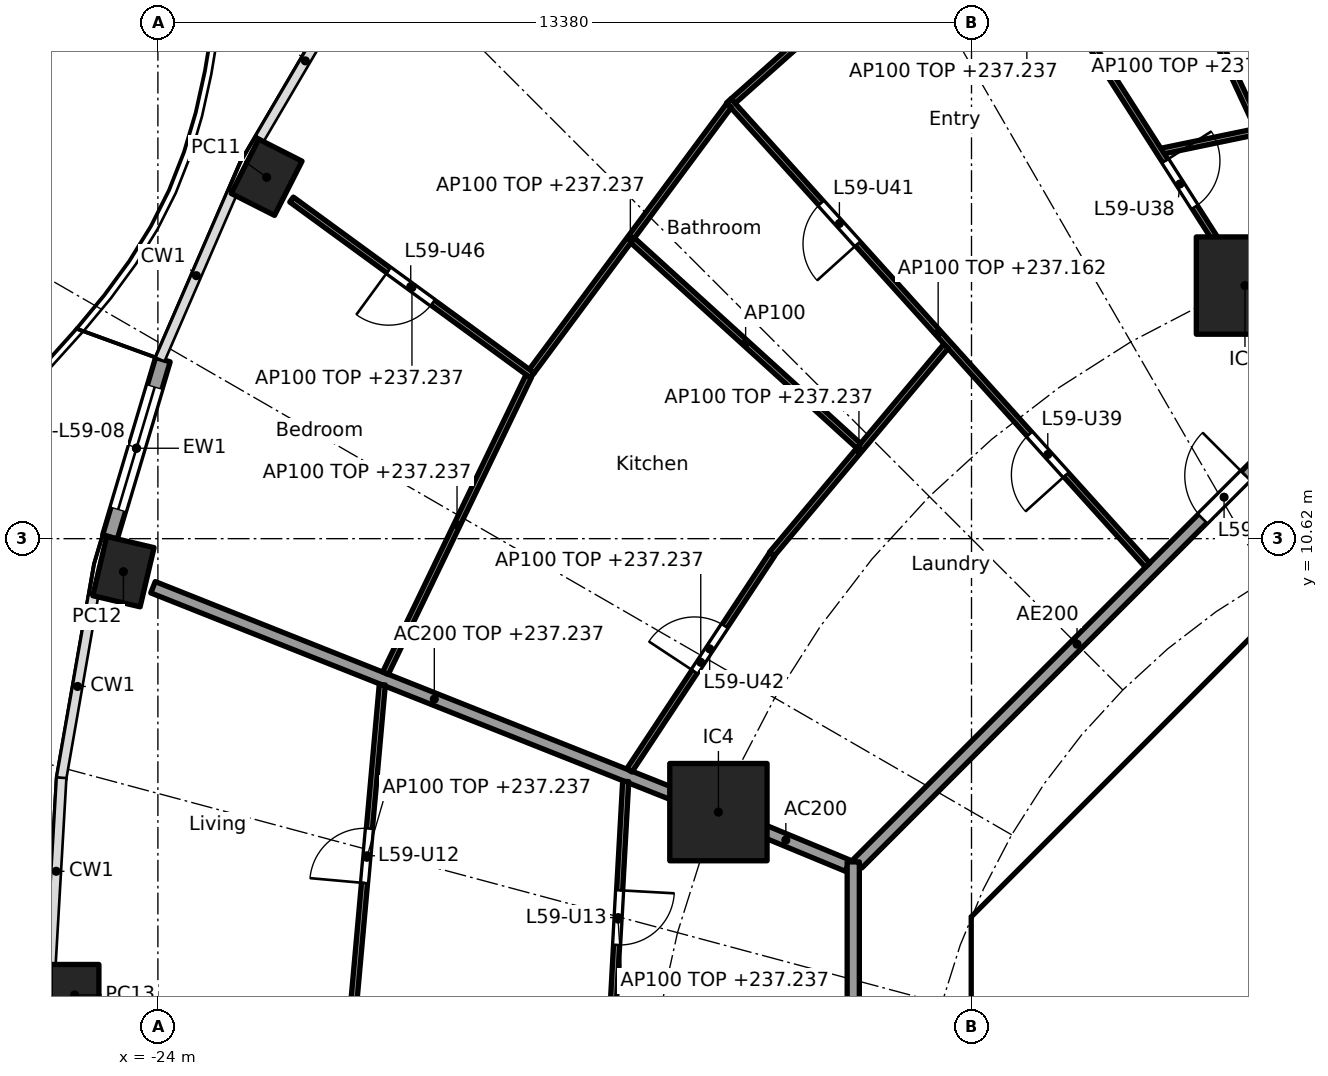
"""IFC4 building model, lengths in metres.
Left out: names, types, materials, properties, quantities, classifications, styles, units other than length and angle.
Written with IfcOpenShell. Run it as: python <this file> out.ifc"""

import sys

from ifc_helpers import new_model, si_unit, direction, frame, frame_2d, origin, origin_2d, place, context, subcontext, project, spatial, polyline, rectangle, hollow_rectangle, outline, extrude, element, fill, save


model = new_model("IFC4")
c1 = context("Model", 3, precision=1e-05, world=origin(), true_north=direction((0.0, 1.0)))
c2 = subcontext(c1, "Body", "Model", "MODEL_VIEW")
j1 = project(units=[si_unit("LENGTHUNIT", "METRE"), si_unit("PLANEANGLEUNIT", "RADIAN")], contexts=[c1])
p1 = place(None, origin())
s1 = spatial("IfcSite", under=j1, at=p1, CompositionType="ELEMENT")
p2 = place(p1, origin())
s2 = spatial("IfcBuilding", under=s1, at=p2, CompositionType="ELEMENT")
p3 = place(p2, frame((0.0, 0.0, 234.4)))
s3 = spatial("IfcBuildingStorey", under=s2, at=p3, CompositionType="ELEMENT", Elevation=234.4)
for number, where, z_axis, x_axis in (
    (1, (-22.212, 16.563, 0.0), (0.0, 0.0, 1.0), (-0.452, -0.892, 0.0)),
    (2, (-24.567, 10.077, 0.0), (0.0, 0.0, 1.0), (-0.229, -0.973, 0.0)),
    (3, (-25.37, 3.118, 0.0), (0.0, 0.0, 1.0), (0.0, -1.0, 0.0)),
):
    element("IfcColumn", number, at=place(p3, frame(where, z_axis=z_axis, x_axis=x_axis)), inside=s3, PredefinedType="COLUMN", context=c2, shape_type="SweptSolid", body=[
        extrude(hollow_rectangle(XDim=1.0, YDim=0.8, WallThickness=0.032, at=origin_2d()), origin(), (0.0, 0.0, 1.0), 3.7),
    ])
for number, where, z_axis, x_axis in (
    (4, (-6.123, 14.782, 0.0), (0.0, 0.0, 1.0), (1.0, 0.0, 0.0)),
    (5, (-14.782, 6.123, 0.0), (0.0, 0.0, 1.0), (1.0, 0.0, 0.0)),
):
    element("IfcColumn", number, at=place(p3, frame(where, z_axis=z_axis, x_axis=x_axis)), inside=s3, PredefinedType="COLUMN", context=c2, shape_type="SweptSolid", body=[
        extrude(rectangle(XDim=1.6, YDim=1.6, at=origin_2d()), origin(), (0.0, 0.0, 1.0), 3.7),
    ])
p4 = place(p3, frame((-24.787, 10.65, 0.0), z_axis=(0.0, 0.0, 1.0), x_axis=(0.285859454825, 0.95827155446, 0.0)))
e6 = element("IfcWall", 6, at=p4, inside=s3, PredefinedType="SOLIDWALL", context=c2, shape_type="SweptSolid", body=[
    extrude(rectangle(XDim=3.041, YDim=0.25, at=frame_2d((1.52, 0.0))), origin(), (0.0, 0.0, 1.0), 3.44),
])
p5 = place(p4, frame((0.47, 0.0, 0.0)))
e7 = element("IfcOpeningElement", 7, at=p5, cuts=e6, PredefinedType="OPENING", context=c2, shape_type="SweptSolid", body=[
    extrude(rectangle(XDim=2.1, YDim=2.4, at=frame_2d((1.05, 1.2))), frame((0.0, 0.135, 0.0), z_axis=(0.0, -1.0, 0.0), x_axis=(1.0, 0.0, 0.0)), (0.0, 0.0, 1.0), 0.27),
])
p6 = place(p3, frame((-4.613, 9.988, 0.0), z_axis=(0.0, 0.0, 1.0), x_axis=(-0.707106781187, -0.707106781187, 0.0)))
e8 = element("IfcWall", 8, at=p6, inside=s3, PredefinedType="SHEAR", context=c2, shape_type="SweptSolid", body=[
    extrude(rectangle(XDim=7.602, YDim=0.6, at=frame_2d((3.801, 0.0))), origin(), (0.0, 0.0, 1.0), 3.44),
])
p7 = place(p6, frame((0.351, 0.0, 0.0)))
e9 = element("IfcOpeningElement", 9, at=p7, cuts=e8, PredefinedType="OPENING", context=c2, shape_type="SweptSolid", body=[
    extrude(rectangle(XDim=1.1, YDim=2.1, at=frame_2d((0.55, 1.05))), frame((0.0, 0.31, 0.0), z_axis=(0.0, -1.0, 0.0), x_axis=(1.0, 0.0, 0.0)), (0.0, 0.0, 1.0), 0.62),
])
p8 = place(p3, frame((-10.325, 3.801, 0.0), z_axis=(0.0, 0.0, 1.0), x_axis=(0.0, -1.0, 0.0)))
e10 = element("IfcWall", 10, at=p8, inside=s3, PredefinedType="SHEAR", context=c2, shape_type="SweptSolid", body=[
    extrude(rectangle(XDim=7.602, YDim=0.6, at=frame_2d((3.801, 0.0))), origin(), (0.0, 0.0, 1.0), 3.44),
])
p9 = place(p8, frame((0.651, 0.0, 0.0)))
e11 = element("IfcOpeningElement", 11, at=p9, cuts=e10, PredefinedType="OPENING", context=c2, shape_type="SweptSolid", body=[
    extrude(rectangle(XDim=1.5, YDim=2.1, at=frame_2d((0.75, 1.05))), frame((0.0, 0.31, 0.0), z_axis=(0.0, -1.0, 0.0), x_axis=(1.0, 0.0, 0.0)), (0.0, 0.0, 1.0), 0.62),
])
p10 = place(p8, frame((5.451, 0.0, 0.0)))
e12 = element("IfcOpeningElement", 12, at=p10, cuts=e10, PredefinedType="OPENING", context=c2, shape_type="SweptSolid", body=[
    extrude(rectangle(XDim=1.5, YDim=2.1, at=frame_2d((0.75, 1.05))), frame((0.0, 0.31, 0.0), z_axis=(0.0, -1.0, 0.0), x_axis=(1.0, 0.0, 0.0)), (0.0, 0.0, 1.0), 0.62),
])
p11 = place(p3, frame((-7.0, 4.1, 0.0), z_axis=(0.0, 0.0, 1.0), x_axis=(0.0, 1.0, 0.0)))
e13 = element("IfcWall", 13, at=p11, inside=s3, PredefinedType="PARTITIONING", context=c2, shape_type="SweptSolid", body=[
    extrude(rectangle(XDim=2.927, YDim=0.15, at=frame_2d((1.463, 0.0))), origin(), (0.0, 0.0, 1.0), 3.44),
])
p12 = place(p11, frame((1.051, 0.0, 0.0)))
e14 = element("IfcOpeningElement", 14, at=p12, cuts=e13, PredefinedType="OPENING", context=c2, shape_type="SweptSolid", body=[
    extrude(rectangle(XDim=0.9, YDim=2.1, at=frame_2d((0.45, 1.05))), frame((0.0, 0.085, 0.0), z_axis=(0.0, -1.0, 0.0), x_axis=(1.0, 0.0, 0.0)), (0.0, 0.0, 1.0), 0.17),
])
p13 = place(p3, origin())
e15 = element("IfcWall", 15, at=p13, inside=s3, PredefinedType="SHEAR", context=c2, shape_type="SweptSolid", body=[
    extrude(outline(polyline([(-10.2, 4.825), (-9.776, 4.401), (-10.025, 4.152), (-10.025, 3.801), (-10.625, 3.801), (-10.625, 4.401), (-10.2, 4.825)])), origin(), (0.0, 0.0, 1.0), 3.44),
])
p14 = place(p3, origin())
e16 = element("IfcWall", 16, at=p14, inside=s3, PredefinedType="SOLIDWALL", context=c2, shape_type="SweptSolid", body=[
    extrude(outline(polyline([(-6.7, 4.3), (6.7, 4.3), (6.7, 2.1), (6.5, 2.1), (6.5, 4.1), (4.5, 4.1), (4.5, 2.1), (4.3, 2.1), (4.3, 4.1), (2.3, 4.1), (2.3, 2.1), (2.1, 2.1), (2.1, 4.1), (0.1, 4.1), (0.1, 2.1), (-0.1, 2.1), (-0.1, 4.1), (-6.5, 4.1), (-6.5, 2.1), (-6.7, 2.1), (-6.7, 4.3)])), origin(), (0.0, 0.0, 1.0), 3.44),
])
p15 = place(p3, frame((-10.025, 4.0, 0.0), z_axis=(0.0, 0.0, 1.0), x_axis=(1.0, 0.0, 0.0)))
e17 = element("IfcWall", 17, at=p15, inside=s3, PredefinedType="PARTITIONING", context=c2, shape_type="SweptSolid", body=[
    extrude(rectangle(XDim=3.325, YDim=0.2, at=frame_2d((1.662, 0.0))), origin(), (0.0, 0.0, 1.0), 3.44),
])
p16 = place(p3, frame((-12.657, 5.243, 0.0), z_axis=(0.0, 0.0, 1.0), x_axis=(-0.923859888513, 0.38273085373, 0.0)))
e18 = element("IfcWall", 18, at=p16, inside=s3, PredefinedType="PARTITIONING", context=c2, shape_type="SweptSolid", body=[
    extrude(rectangle(XDim=2.199, YDim=0.2, at=frame_2d((1.1, 0.0))), origin(), (0.0, 0.0, 1.0), 3.44),
])
p17 = place(p3, frame((-14.829, 6.141, 0.0), z_axis=(0.0, 0.0, 1.0), x_axis=(-0.929202069098, 0.36957206981, 0.0)))
e19 = element("IfcWall", 19, at=p17, inside=s3, PredefinedType="PARTITIONING", context=c2, shape_type="SweptSolid", body=[
    extrude(rectangle(XDim=9.957, YDim=0.2, at=frame_2d((4.978, 0.0))), origin(), (0.0, 0.0, 1.0), 2.837),
])
p18 = place(p3, frame((-5.275, 12.494, 0.0), z_axis=(0.0, 0.0, 1.0), x_axis=(-0.707106781187, -0.707106781187, 0.0)))
e20 = element("IfcWall", 20, at=p18, inside=s3, PredefinedType="PARTITIONING", context=c2, shape_type="SweptSolid", body=[
    extrude(rectangle(XDim=10.209, YDim=0.2, at=frame_2d((5.104, 0.0))), origin(), (0.0, 0.0, 1.0), 3.44),
])
p19 = place(p18, frame((1.185, 0.0, 0.0)))
e21 = element("IfcOpeningElement", 21, at=p19, cuts=e20, PredefinedType="OPENING", context=c2, shape_type="SweptSolid", body=[
    extrude(rectangle(XDim=1.0, YDim=2.1, at=frame_2d((0.5, 1.05))), frame((0.0, 0.11, 0.0), z_axis=(0.0, -1.0, 0.0), x_axis=(1.0, 0.0, 0.0)), (0.0, 0.0, 1.0), 0.22),
])
p20 = place(p3, frame((-12.565, 5.304, 0.0), z_axis=(0.0, 0.0, 1.0), x_axis=(0.0, -1.0, 0.0)))
e22 = element("IfcWall", 22, at=p20, inside=s3, PredefinedType="PARTITIONING", context=c2, shape_type="SweptSolid", body=[
    extrude(rectangle(XDim=10.409, YDim=0.2, at=frame_2d((5.205, 0.0))), origin(), (0.0, 0.0, 1.0), 3.44),
])
p21 = place(p3, frame((-4.28, 17.657, 0.0), z_axis=(0.0, 0.0, 1.0), x_axis=(-0.979205232861, -0.202872156637, 0.0)))
e23 = element("IfcWall", 23, at=p21, inside=s3, PredefinedType="PARTITIONING", context=c2, shape_type="SweptSolid", body=[
    extrude(rectangle(XDim=3.271, YDim=0.1, at=frame_2d((1.635, 0.0))), origin(), (0.0, 0.0, 1.0), 2.837),
])
p22 = place(p3, frame((-5.902, 17.371, 0.0), z_axis=(0.0, 0.0, 1.0), x_axis=(-0.421124629357, 0.907002781996, 0.0)))
e24 = element("IfcWall", 24, at=p22, inside=s3, PredefinedType="PARTITIONING", context=c2, shape_type="SweptSolid", body=[
    extrude(rectangle(XDim=5.384, YDim=0.1, at=frame_2d((2.692, 0.0))), origin(), (0.0, 0.0, 1.0), 3.44),
])
p23 = place(p3, frame((-5.243, 12.657, 0.0), z_axis=(0.0, 0.0, 1.0), x_axis=(-0.382757529444, 0.923848837015, 0.0)))
e25 = element("IfcWall", 25, at=p23, inside=s3, PredefinedType="PARTITIONING", context=c2, shape_type="SweptSolid", body=[
    extrude(rectangle(XDim=2.25, YDim=0.1, at=frame_2d((1.125, 0.0))), origin(), (0.0, 0.0, 1.0), 3.44),
])
p24 = place(p3, frame((-6.15, 14.824, 0.0), z_axis=(0.0, 0.0, 1.0), x_axis=(-0.538870687577, 0.842388498301, 0.0)))
e26 = element("IfcWall", 26, at=p24, inside=s3, PredefinedType="PARTITIONING", context=c2, shape_type="SweptSolid", body=[
    extrude(rectangle(XDim=13.213, YDim=0.1, at=frame_2d((6.606, 0.0))), origin(), (0.0, 0.0, 1.0), 2.837),
])
p25 = place(p24, frame((1.483, 0.0, 0.0)))
e27 = element("IfcOpeningElement", 27, at=p25, cuts=e26, PredefinedType="OPENING", context=c2, shape_type="SweptSolid", body=[
    extrude(rectangle(XDim=0.9, YDim=2.1, at=frame_2d((0.45, 1.05))), frame((0.0, 0.06, 0.0), z_axis=(0.0, -1.0, 0.0), x_axis=(1.0, 0.0, 0.0)), (0.0, 0.0, 1.0), 0.12),
])
p26 = place(p3, frame((-10.45, 21.455, 0.0), z_axis=(0.0, 0.0, 1.0), x_axis=(-0.747150931973, -0.66465441009, 0.0)))
e28 = element("IfcWall", 28, at=p26, inside=s3, PredefinedType="PARTITIONING", context=c2, shape_type="SweptSolid", body=[
    extrude(rectangle(XDim=5.475, YDim=0.1, at=frame_2d((2.737, 0.0))), origin(), (0.0, 0.0, 1.0), 2.837),
])
p27 = place(p26, frame((2.288, 0.0, 0.0)))
e29 = element("IfcOpeningElement", 29, at=p27, cuts=e28, PredefinedType="OPENING", context=c2, shape_type="SweptSolid", body=[
    extrude(rectangle(XDim=0.9, YDim=2.1, at=frame_2d((0.45, 1.05))), frame((0.0, 0.06, 0.0), z_axis=(0.0, -1.0, 0.0), x_axis=(1.0, 0.0, 0.0)), (0.0, 0.0, 1.0), 0.12),
])
p28 = place(p3, frame((-7.725, 10.186, 0.0), z_axis=(0.0, 0.0, 1.0), x_axis=(-0.669819599194, 0.742523874725, 0.0)))
e30 = element("IfcWall", 30, at=p28, inside=s3, PredefinedType="PARTITIONING", context=c2, shape_type="SweptSolid", body=[
    extrude(rectangle(XDim=10.282, YDim=0.1, at=frame_2d((5.141, 0.0))), origin(), (0.0, 0.0, 1.0), 2.762),
])
p29 = place(p28, frame((2.0, 0.0, 0.0)))
e31 = element("IfcOpeningElement", 31, at=p29, cuts=e30, PredefinedType="OPENING", context=c2, shape_type="SweptSolid", body=[
    extrude(rectangle(XDim=0.9, YDim=2.1, at=frame_2d((0.45, 1.05))), frame((0.0, 0.06, 0.0), z_axis=(0.0, -1.0, 0.0), x_axis=(1.0, 0.0, 0.0)), (0.0, 0.0, 1.0), 0.12),
])
p30 = place(p28, frame((7.116, 0.0, 0.0)))
e32 = element("IfcOpeningElement", 32, at=p30, cuts=e30, PredefinedType="OPENING", context=c2, shape_type="SweptSolid", body=[
    extrude(rectangle(XDim=0.9, YDim=2.1, at=frame_2d((0.45, 1.05))), frame((0.0, 0.06, 0.0), z_axis=(0.0, -1.0, 0.0), x_axis=(1.0, 0.0, 0.0)), (0.0, 0.0, 1.0), 0.12),
])
p31 = place(p3, frame((-11.039, 13.785, 0.0), z_axis=(0.0, 0.0, 1.0), x_axis=(-0.642254625966, -0.766491353784, 0.0)))
e33 = element("IfcWall", 33, at=p31, inside=s3, PredefinedType="PARTITIONING", context=c2, shape_type="SweptSolid", body=[
    extrude(rectangle(XDim=4.461, YDim=0.1, at=frame_2d((2.23, 0.0))), origin(), (0.0, 0.0, 1.0), 2.837),
])
p32 = place(p3, frame((-14.608, 17.743, 0.0), z_axis=(0.0, 0.0, 1.0), x_axis=(-0.596174489482, -0.8028548923, 0.0)))
e34 = element("IfcWall", 34, at=p32, inside=s3, PredefinedType="PARTITIONING", context=c2, shape_type="SweptSolid", body=[
    extrude(rectangle(XDim=5.442, YDim=0.1, at=frame_2d((2.721, 0.0))), origin(), (0.0, 0.0, 1.0), 2.837),
])
p33 = place(p3, frame((-12.476, 12.147, 0.0), z_axis=(0.0, 0.0, 1.0), x_axis=(-0.740129203525, 0.672464692077, 0.0)))
e35 = element("IfcWall", 35, at=p33, inside=s3, PredefinedType="PARTITIONING", context=c2, shape_type="SweptSolid", body=[
    extrude(rectangle(XDim=5.022, YDim=0.1, at=frame_2d((2.511, 0.0))), origin(), (0.0, 0.0, 1.0), 3.44),
])
p34 = place(p3, frame((-13.899, 10.363, 0.0), z_axis=(0.0, 0.0, 1.0), x_axis=(-0.551267958114, -0.834328255758, 0.0)))
e36 = element("IfcWall", 36, at=p34, inside=s3, PredefinedType="PARTITIONING", context=c2, shape_type="SweptSolid", body=[
    extrude(rectangle(XDim=4.257, YDim=0.1, at=frame_2d((2.129, 0.0))), origin(), (0.0, 0.0, 1.0), 2.837),
])
p35 = place(p34, frame((1.413, 0.0, 0.0)))
e37 = element("IfcOpeningElement", 37, at=p35, cuts=e36, PredefinedType="OPENING", context=c2, shape_type="SweptSolid", body=[
    extrude(rectangle(XDim=0.9, YDim=2.1, at=frame_2d((0.45, 1.05))), frame((0.0, 0.06, 0.0), z_axis=(0.0, -1.0, 0.0), x_axis=(1.0, 0.0, 0.0)), (0.0, 0.0, 1.0), 0.12),
])
p36 = place(p3, frame((-17.842, 13.304, 0.0), z_axis=(0.0, 0.0, 1.0), x_axis=(-0.807541617862, 0.589810592835, 0.0)))
e38 = element("IfcWall", 38, at=p36, inside=s3, PredefinedType="PARTITIONING", context=c2, shape_type="SweptSolid", body=[
    extrude(rectangle(XDim=4.903, YDim=0.1, at=frame_2d((2.452, 0.0))), origin(), (0.0, 0.0, 1.0), 2.837),
])
p37 = place(p36, frame((2.027, 0.0, 0.0)))
e39 = element("IfcOpeningElement", 39, at=p37, cuts=e38, PredefinedType="OPENING", context=c2, shape_type="SweptSolid", body=[
    extrude(rectangle(XDim=0.9, YDim=2.1, at=frame_2d((0.45, 1.05))), frame((0.0, 0.06, 0.0), z_axis=(0.0, -1.0, 0.0), x_axis=(1.0, 0.0, 0.0)), (0.0, 0.0, 1.0), 0.12),
])
p38 = place(p3, frame((-17.904, 13.289, 0.0), z_axis=(0.0, 0.0, 1.0), x_axis=(-0.43429918566, -0.900768681369, 0.0)))
e40 = element("IfcWall", 40, at=p38, inside=s3, PredefinedType="PARTITIONING", context=c2, shape_type="SweptSolid", body=[
    extrude(rectangle(XDim=5.418, YDim=0.1, at=frame_2d((2.709, 0.0))), origin(), (0.0, 0.0, 1.0), 2.837),
])
p39 = place(p3, frame((-16.307, 6.627, 0.0), z_axis=(0.0, 0.0, 1.0), x_axis=(-0.055616130958, -0.998452225185, 0.0)))
e41 = element("IfcWall", 41, at=p39, inside=s3, PredefinedType="PARTITIONING", context=c2, shape_type="SweptSolid", body=[
    extrude(rectangle(XDim=4.535, YDim=0.1, at=frame_2d((2.267, 0.0))), origin(), (0.0, 0.0, 1.0), 2.837),
])
p40 = place(p39, frame((1.792, 0.0, 0.0)))
e42 = element("IfcOpeningElement", 42, at=p40, cuts=e41, PredefinedType="OPENING", context=c2, shape_type="SweptSolid", body=[
    extrude(rectangle(XDim=0.9, YDim=2.1, at=frame_2d((0.45, 1.05))), frame((0.0, 0.06, 0.0), z_axis=(0.0, -1.0, 0.0), x_axis=(1.0, 0.0, 0.0)), (0.0, 0.0, 1.0), 0.12),
])
p41 = place(p3, frame((-20.31, 8.218, 0.0), z_axis=(0.0, 0.0, 1.0), x_axis=(-0.089284106956, -0.996006198899, 0.0)))
e43 = element("IfcWall", 43, at=p41, inside=s3, PredefinedType="PARTITIONING", context=c2, shape_type="SweptSolid", body=[
    extrude(rectangle(XDim=5.698, YDim=0.1, at=frame_2d((2.849, 0.0))), origin(), (0.0, 0.0, 1.0), 2.837),
])
p42 = place(p41, frame((2.374, 0.0, 0.0)))
e44 = element("IfcOpeningElement", 44, at=p42, cuts=e43, PredefinedType="OPENING", context=c2, shape_type="SweptSolid", body=[
    extrude(rectangle(XDim=0.9, YDim=2.1, at=frame_2d((0.45, 1.05))), frame((0.0, 0.06, 0.0), z_axis=(0.0, -1.0, 0.0), x_axis=(1.0, 0.0, 0.0)), (0.0, 0.0, 1.0), 0.12),
])
p43 = place(p5, origin())
e45 = element("IfcDoor", 45, at=p43, inside=s3, OperationType="SLIDING_TO_LEFT", PredefinedType="DOOR", context=c2, shape_type="SweptSolid", body=[
    extrude(rectangle(XDim=2.1, YDim=2.4, at=frame_2d((1.05, 1.2))), frame((0.0, 0.025, 0.0), z_axis=(0.0, -1.0, 0.0), x_axis=(1.0, 0.0, 0.0)), (0.0, 0.0, 1.0), 0.05),
])
fill(e7, e45)
p44 = place(p12, origin())
e46 = element("IfcDoor", 46, at=p44, inside=s3, OperationType="SINGLE_SWING_LEFT", PredefinedType="DOOR", context=c2, shape_type="SweptSolid", body=[
    extrude(rectangle(XDim=0.9, YDim=2.1, at=frame_2d((0.45, 1.05))), frame((0.0, 0.025, 0.0), z_axis=(0.0, -1.0, 0.0), x_axis=(1.0, 0.0, 0.0)), (0.0, 0.0, 1.0), 0.05),
])
fill(e14, e46)
p45 = place(p9, origin())
e47 = element("IfcDoor", 47, at=p45, inside=s3, OperationType="DOUBLE_DOOR_SINGLE_SWING", PredefinedType="DOOR", context=c2, shape_type="SweptSolid", body=[
    extrude(rectangle(XDim=1.5, YDim=2.1, at=frame_2d((0.75, 1.05))), frame((0.0, 0.025, 0.0), z_axis=(0.0, -1.0, 0.0), x_axis=(1.0, 0.0, 0.0)), (0.0, 0.0, 1.0), 0.05),
])
fill(e11, e47)
p46 = place(p42, frame((0.9, 0.0, 0.0), x_axis=(-1.0, 0.0, 0.0)))
e48 = element("IfcDoor", 48, at=p46, inside=s3, OperationType="SINGLE_SWING_LEFT", PredefinedType="DOOR", context=c2, shape_type="SweptSolid", body=[
    extrude(rectangle(XDim=0.9, YDim=2.1, at=frame_2d((0.45, 1.05))), frame((0.0, 0.025, 0.0), z_axis=(0.0, -1.0, 0.0), x_axis=(1.0, 0.0, 0.0)), (0.0, 0.0, 1.0), 0.05),
])
fill(e44, e48)
p47 = place(p40, origin())
e49 = element("IfcDoor", 49, at=p47, inside=s3, OperationType="SINGLE_SWING_LEFT", PredefinedType="DOOR", context=c2, shape_type="SweptSolid", body=[
    extrude(rectangle(XDim=0.9, YDim=2.1, at=frame_2d((0.45, 1.05))), frame((0.0, 0.025, 0.0), z_axis=(0.0, -1.0, 0.0), x_axis=(1.0, 0.0, 0.0)), (0.0, 0.0, 1.0), 0.05),
])
fill(e42, e49)
p48 = place(p19, frame((1.0, 0.0, 0.0), x_axis=(-1.0, 0.0, 0.0)))
e50 = element("IfcDoor", 50, at=p48, inside=s3, OperationType="SINGLE_SWING_RIGHT", PredefinedType="DOOR", context=c2, shape_type="SweptSolid", body=[
    extrude(rectangle(XDim=1.0, YDim=2.1, at=frame_2d((0.5, 1.05))), frame((0.0, 0.025, 0.0), z_axis=(0.0, -1.0, 0.0), x_axis=(1.0, 0.0, 0.0)), (0.0, 0.0, 1.0), 0.05),
])
fill(e21, e50)
p49 = place(p25, frame((0.9, 0.0, 0.0), x_axis=(-1.0, 0.0, 0.0)))
e51 = element("IfcDoor", 51, at=p49, inside=s3, OperationType="SINGLE_SWING_LEFT", PredefinedType="DOOR", context=c2, shape_type="SweptSolid", body=[
    extrude(rectangle(XDim=0.9, YDim=2.1, at=frame_2d((0.45, 1.05))), frame((0.0, 0.025, 0.0), z_axis=(0.0, -1.0, 0.0), x_axis=(1.0, 0.0, 0.0)), (0.0, 0.0, 1.0), 0.05),
])
fill(e27, e51)
p50 = place(p29, origin())
e52 = element("IfcDoor", 52, at=p50, inside=s3, OperationType="SINGLE_SWING_LEFT", PredefinedType="DOOR", context=c2, shape_type="SweptSolid", body=[
    extrude(rectangle(XDim=0.9, YDim=2.1, at=frame_2d((0.45, 1.05))), frame((0.0, 0.025, 0.0), z_axis=(0.0, -1.0, 0.0), x_axis=(1.0, 0.0, 0.0)), (0.0, 0.0, 1.0), 0.05),
])
fill(e31, e52)
p51 = place(p30, origin())
e53 = element("IfcDoor", 53, at=p51, inside=s3, OperationType="SINGLE_SWING_LEFT", PredefinedType="DOOR", context=c2, shape_type="SweptSolid", body=[
    extrude(rectangle(XDim=0.9, YDim=2.1, at=frame_2d((0.45, 1.05))), frame((0.0, 0.025, 0.0), z_axis=(0.0, -1.0, 0.0), x_axis=(1.0, 0.0, 0.0)), (0.0, 0.0, 1.0), 0.05),
])
fill(e32, e53)
p52 = place(p35, frame((0.9, 0.0, 0.0), x_axis=(-1.0, 0.0, 0.0)))
e54 = element("IfcDoor", 54, at=p52, inside=s3, OperationType="SINGLE_SWING_LEFT", PredefinedType="DOOR", context=c2, shape_type="SweptSolid", body=[
    extrude(rectangle(XDim=0.9, YDim=2.1, at=frame_2d((0.45, 1.05))), frame((0.0, 0.025, 0.0), z_axis=(0.0, -1.0, 0.0), x_axis=(1.0, 0.0, 0.0)), (0.0, 0.0, 1.0), 0.05),
])
fill(e37, e54)
p53 = place(p37, origin())
e55 = element("IfcDoor", 55, at=p53, inside=s3, OperationType="SINGLE_SWING_RIGHT", PredefinedType="DOOR", context=c2, shape_type="SweptSolid", body=[
    extrude(rectangle(XDim=0.9, YDim=2.1, at=frame_2d((0.45, 1.05))), frame((0.0, 0.025, 0.0), z_axis=(0.0, -1.0, 0.0), x_axis=(1.0, 0.0, 0.0)), (0.0, 0.0, 1.0), 0.05),
])
fill(e39, e55)
save(model, sys.argv[1])
